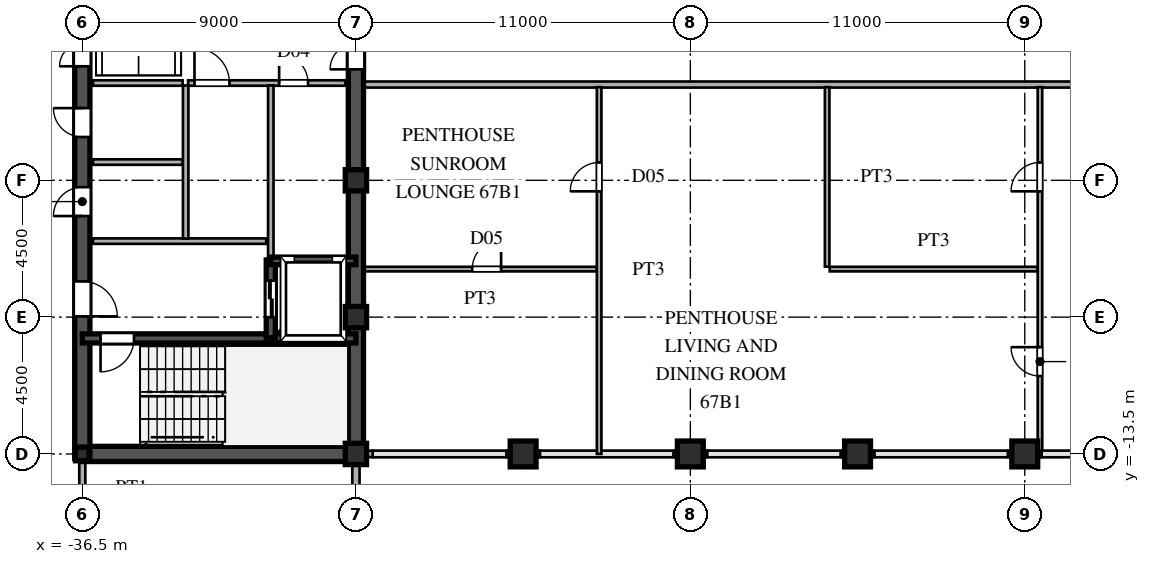
"""IFC4 building model, lengths in metres.
Left out: names, types, materials, properties, quantities, classifications, styles, units other than length and angle.
Written with IfcOpenShell. Run it as: python <this file> out.ifc"""

import sys

from ifc_helpers import new_model, si_unit, direction, frame, frame_2d, origin, origin_2d, place, context, subcontext, project, spatial, rectangle, hollow_rectangle, i_section, extrude, source, transform, mapped, element, fill, save


model = new_model("IFC4")
c1 = context("Model", 3, precision=1e-05, world=origin(), true_north=direction((0.0, 1.0)))
c2 = subcontext(c1, "Body", "Model", "MODEL_VIEW")
j1 = project(units=[si_unit("LENGTHUNIT", "METRE"), si_unit("PLANEANGLEUNIT", "RADIAN")], contexts=[c1])
p1 = place(None, origin())
s1 = spatial("IfcSite", under=j1, at=p1, CompositionType="ELEMENT")
p2 = place(p1, origin())
s2 = spatial("IfcBuilding", under=s1, at=p2, CompositionType="ELEMENT")
p3 = place(p2, frame((0.0, 0.0, 254.4)))
s3 = spatial("IfcBuildingStorey", under=s2, at=p3, CompositionType="ELEMENT", Elevation=254.4)
m1 = source(origin(), c2, "Body", "SweptSolid", [
    extrude(hollow_rectangle(XDim=0.7, YDim=0.7, WallThickness=0.03, at=origin_2d()), origin(), (0.0, 0.0, 1.0), 3.75),
])
for number, where, z_axis, x_axis in (
    (1, (-27.5, -13.5, 0.0), (0.0, 0.0, 1.0), (1.0, 0.0, 0.0)),
    (2, (-27.5, -9.0, 0.0), (0.0, 0.0, 1.0), (1.0, 0.0, 0.0)),
    (3, (-27.5, -4.5, 0.0), (0.0, 0.0, 1.0), (1.0, 0.0, 0.0)),
):
    element("IfcColumn", number, at=place(p3, frame(where, z_axis=z_axis, x_axis=x_axis)), inside=s3, PredefinedType="COLUMN", context=c2, shape_type="MappedRepresentation", body=[
        mapped(m1, transform((0.0, 0.0, 0.0), scale=1.0)),
    ])
m2 = source(origin(), c2, "Body", "SweptSolid", [
    extrude(i_section(OverallWidth=0.45, OverallDepth=0.45, WebThickness=0.016, FlangeThickness=0.025, at=origin_2d()), origin(), (0.0, 0.0, 1.0), 3.75),
])
p4 = place(p3, frame((-36.5, -13.5, 0.0), z_axis=(0.0, 0.0, 1.0), x_axis=(1.0, 0.0, 0.0)))
e4 = element("IfcColumn", 4, at=p4, inside=s3, PredefinedType="COLUMN", context=c2, shape_type="MappedRepresentation", body=[
    mapped(m2, transform((0.0, 0.0, 0.0), scale=1.0)),
])
m3 = source(origin(), c2, "Body", "SweptSolid", [
    extrude(hollow_rectangle(XDim=0.85, YDim=0.85, WallThickness=0.036, at=origin_2d()), origin(), (0.0, 0.0, 1.0), 3.75),
])
for number, where, z_axis, x_axis in (
    (5, (-22.0, -13.5, 0.0), (0.0, 0.0, 1.0), (1.0, 0.0, 0.0)),
    (6, (-16.5, -13.5, 0.0), (0.0, 0.0, 1.0), (1.0, 0.0, 0.0)),
    (7, (-11.0, -13.5, 0.0), (0.0, 0.0, 1.0), (1.0, 0.0, 0.0)),
    (8, (-5.5, -13.5, 0.0), (0.0, 0.0, 1.0), (1.0, 0.0, 0.0)),
):
    element("IfcColumn", number, at=place(p3, frame(where, z_axis=z_axis, x_axis=x_axis)), inside=s3, PredefinedType="COLUMN", context=c2, shape_type="MappedRepresentation", body=[
        mapped(m3, transform((0.0, 0.0, 0.0), scale=1.0)),
    ])
p5 = place(p3, frame((-27.5, -15.98, 0.0), z_axis=(0.0, 0.0, 1.0), x_axis=(0.0, 1.0, 0.0)))
e9 = element("IfcWall", 9, at=p5, inside=s3, PredefinedType="SOLIDWALL", context=c2, shape_type="SweptSolid", body=[
    extrude(rectangle(XDim=1.605, YDim=0.24, at=frame_2d((0.803, 0.0))), origin(), (0.0, 0.0, 1.0), 3.53),
])
p6 = place(p3, frame((-27.5, -14.375, 0.0), z_axis=(0.0, 0.0, 1.0), x_axis=(0.0, 1.0, 0.0)))
e10 = element("IfcWall", 10, at=p6, inside=s3, PredefinedType="SOLIDWALL", context=c2, shape_type="SweptSolid", body=[
    extrude(rectangle(XDim=0.62, YDim=0.24, at=frame_2d((0.31, 0.0))), origin(), (0.0, 0.0, 1.0), 3.03),
])
p7 = place(p3, frame((-27.49, -13.5, 0.0), z_axis=(0.0, 0.0, 1.0), x_axis=(1.0, 0.0, 0.0)))
e11 = element("IfcWall", 11, at=p7, inside=s3, PredefinedType="SOLIDWALL", context=c2, shape_type="SweptSolid", body=[
    extrude(rectangle(XDim=0.54, YDim=0.21, at=frame_2d((0.27, 0.0))), origin(), (0.0, 0.0, 1.0), 3.03),
])
for number, where, z_axis, x_axis in (
    (12, (-22.55, -13.5, 0.0), (0.0, 0.0, 1.0), (1.0, 0.0, 0.0)),
    (13, (-17.05, -13.5, 0.0), (0.0, 0.0, 1.0), (1.0, 0.0, 0.0)),
    (14, (-11.55, -13.5, 0.0), (0.0, 0.0, 1.0), (1.0, 0.0, 0.0)),
    (15, (-6.05, -13.5, 0.0), (0.0, 0.0, 1.0), (1.0, 0.0, 0.0)),
):
    element("IfcWall", number, at=place(p3, frame(where, z_axis=z_axis, x_axis=x_axis)), inside=s3, PredefinedType="SOLIDWALL", context=c2, shape_type="SweptSolid", body=[
        extrude(rectangle(XDim=1.1, YDim=0.21, at=frame_2d((0.55, 0.0))), origin(), (0.0, 0.0, 1.0), 3.03),
    ])
p8 = place(p3, frame((-27.5, -13.5, 0.0), z_axis=(0.0, 0.0, 1.0), x_axis=(0.0, 1.0, 0.0)))
e16 = element("IfcWall", 16, at=p8, inside=s3, PredefinedType="SHEAR", context=c2, shape_type="SweptSolid", body=[
    extrude(rectangle(XDim=12.2, YDim=0.5, at=frame_2d((6.1, 0.0))), origin(), (0.0, 0.0, 1.0), 3.53),
])
p9 = place(p3, frame((-27.5, -1.3, 0.0), z_axis=(0.0, 0.0, 1.0), x_axis=(0.0, 1.0, 0.0)))
e17 = element("IfcWall", 17, at=p9, inside=s3, PredefinedType="SHEAR", context=c2, shape_type="SweptSolid", body=[
    extrude(rectangle(XDim=2.6, YDim=0.5, at=frame_2d((1.3, 0.0))), origin(), (0.0, 0.0, 1.0), 3.53),
])
p10 = place(p9, frame((0.45, 0.0, 0.0)))
e18 = element("IfcOpeningElement", 18, at=p10, cuts=e17, PredefinedType="OPENING", context=c2, shape_type="SweptSolid", body=[
    extrude(rectangle(XDim=1.7, YDim=2.35, at=frame_2d((0.85, 1.175))), frame((0.0, 0.26, 0.0), z_axis=(0.0, -1.0, 0.0), x_axis=(1.0, 0.0, 0.0)), (0.0, 0.0, 1.0), 0.52),
])
p11 = place(p3, frame((-36.5, -13.5, 0.0), z_axis=(0.0, 0.0, 1.0), x_axis=(1.0, 0.0, 0.0)))
e19 = element("IfcWall", 19, at=p11, inside=s3, PredefinedType="SHEAR", context=c2, shape_type="SweptSolid", body=[
    extrude(rectangle(XDim=9.0, YDim=0.5, at=frame_2d((4.5, 0.0))), origin(), (0.0, 0.0, 1.0), 3.53),
])
p12 = place(p3, frame((-36.5, -13.65, 0.0), z_axis=(0.0, 0.0, 1.0), x_axis=(0.0, 1.0, 0.0)))
e20 = element("IfcWall", 20, at=p12, inside=s3, PredefinedType="SHEAR", context=c2, shape_type="SweptSolid", body=[
    extrude(rectangle(XDim=7.15, YDim=0.5, at=frame_2d((3.575, 0.0))), origin(), (0.0, 0.0, 1.0), 3.53),
])
p13 = place(p12, frame((4.675, 0.0, 0.0)))
e21 = element("IfcOpeningElement", 21, at=p13, cuts=e20, PredefinedType="OPENING", context=c2, shape_type="SweptSolid", body=[
    extrude(rectangle(XDim=1.15, YDim=2.2, at=frame_2d((0.575, 1.1))), frame((0.0, 0.26, 0.0), z_axis=(0.0, -1.0, 0.0), x_axis=(1.0, 0.0, 0.0)), (0.0, 0.0, 1.0), 0.52),
])
p14 = place(p3, frame((-36.5, -1.3, 0.0), z_axis=(0.0, 0.0, 1.0), x_axis=(0.0, 1.0, 0.0)))
e22 = element("IfcWall", 22, at=p14, inside=s3, PredefinedType="SHEAR", context=c2, shape_type="SweptSolid", body=[
    extrude(rectangle(XDim=2.6, YDim=0.5, at=frame_2d((1.3, 0.0))), origin(), (0.0, 0.0, 1.0), 3.53),
])
p15 = place(p14, frame((0.55, 0.0, 0.0)))
e23 = element("IfcOpeningElement", 23, at=p15, cuts=e22, PredefinedType="OPENING", context=c2, shape_type="SweptSolid", body=[
    extrude(rectangle(XDim=1.5, YDim=2.3, at=frame_2d((0.75, 1.15))), frame((0.0, 0.26, 0.0), z_axis=(0.0, -1.0, 0.0), x_axis=(1.0, 0.0, 0.0)), (0.0, 0.0, 1.0), 0.52),
])
p16 = place(p3, frame((-36.5, -6.5, 0.0), z_axis=(0.0, 0.0, 1.0), x_axis=(0.0, 1.0, 0.0)))
e24 = element("IfcWall", 24, at=p16, inside=s3, PredefinedType="SHEAR", context=c2, shape_type="SweptSolid", body=[
    extrude(rectangle(XDim=2.6, YDim=0.5, at=frame_2d((1.3, 0.0))), origin(), (0.0, 0.0, 1.0), 3.53),
])
p17 = place(p16, frame((0.825, 0.0, 0.0)))
e25 = element("IfcOpeningElement", 25, at=p17, cuts=e24, PredefinedType="OPENING", context=c2, shape_type="SweptSolid", body=[
    extrude(rectangle(XDim=0.95, YDim=2.15, at=frame_2d((0.475, 1.075))), frame((0.0, 0.26, 0.0), z_axis=(0.0, -1.0, 0.0), x_axis=(1.0, 0.0, 0.0)), (0.0, 0.0, 1.0), 0.52),
])
p18 = place(p3, frame((-36.5, -3.9, 0.0), z_axis=(0.0, 0.0, 1.0), x_axis=(0.0, 1.0, 0.0)))
e26 = element("IfcWall", 26, at=p18, inside=s3, PredefinedType="SHEAR", context=c2, shape_type="SweptSolid", body=[
    extrude(rectangle(XDim=2.6, YDim=0.5, at=frame_2d((1.3, 0.0))), origin(), (0.0, 0.0, 1.0), 3.53),
])
p19 = place(p18, frame((0.825, 0.0, 0.0)))
e27 = element("IfcOpeningElement", 27, at=p19, cuts=e26, PredefinedType="OPENING", context=c2, shape_type="SweptSolid", body=[
    extrude(rectangle(XDim=0.95, YDim=2.15, at=frame_2d((0.475, 1.075))), frame((0.0, 0.26, 0.0), z_axis=(0.0, -1.0, 0.0), x_axis=(1.0, 0.0, 0.0)), (0.0, 0.0, 1.0), 0.52),
])
p20 = place(p3, frame((-36.5, -9.7, 0.0), z_axis=(0.0, 0.0, 1.0), x_axis=(1.0, 0.0, 0.0)))
e28 = element("IfcWall", 28, at=p20, inside=s3, PredefinedType="SHEAR", context=c2, shape_type="SweptSolid", body=[
    extrude(rectangle(XDim=9.0, YDim=0.3, at=frame_2d((4.5, 0.0))), origin(), (0.0, 0.0, 1.0), 3.53),
])
p21 = place(p20, frame((0.6, 0.0, 0.0)))
e29 = element("IfcOpeningElement", 29, at=p21, cuts=e28, PredefinedType="OPENING", context=c2, shape_type="SweptSolid", body=[
    extrude(rectangle(XDim=1.1, YDim=2.2, at=frame_2d((0.55, 1.1))), frame((0.0, 0.16, 0.0), z_axis=(0.0, -1.0, 0.0), x_axis=(1.0, 0.0, 0.0)), (0.0, 0.0, 1.0), 0.32),
])
p22 = place(p3, frame((-30.3, -7.15, 0.0), z_axis=(0.0, 0.0, 1.0), x_axis=(1.0, 0.0, 0.0)))
e30 = element("IfcWall", 30, at=p22, inside=s3, PredefinedType="SHEAR", context=c2, shape_type="SweptSolid", body=[
    extrude(rectangle(XDim=2.8, YDim=0.25, at=frame_2d((1.4, 0.0))), origin(), (0.0, 0.0, 1.0), 3.53),
])
p23 = place(p3, frame((-30.3, -9.68, 0.0), z_axis=(0.0, 0.0, 1.0), x_axis=(0.0, 1.0, 0.0)))
e31 = element("IfcWall", 31, at=p23, inside=s3, PredefinedType="SHEAR", context=c2, shape_type="SweptSolid", body=[
    extrude(rectangle(XDim=2.56, YDim=0.3, at=frame_2d((1.28, 0.0))), origin(), (0.0, 0.0, 1.0), 3.53),
])
p24 = place(p23, frame((0.68, 0.0, 0.0)))
e32 = element("IfcOpeningElement", 32, at=p24, cuts=e31, PredefinedType="OPENING", context=c2, shape_type="SweptSolid", body=[
    extrude(rectangle(XDim=1.2, YDim=2.25, at=frame_2d((0.6, 1.125))), frame((0.0, 0.16, 0.0), z_axis=(0.0, -1.0, 0.0), x_axis=(1.0, 0.0, 0.0)), (0.0, 0.0, 1.0), 0.32),
])
p25 = place(p3, frame((-36.15, -6.5, 0.0), z_axis=(0.0, 0.0, 1.0), x_axis=(1.0, 0.0, 0.0)))
e33 = element("IfcWall", 33, at=p25, inside=s3, PredefinedType="PARTITIONING", context=c2, shape_type="SweptSolid", body=[
    extrude(rectangle(XDim=5.7, YDim=0.18, at=frame_2d((2.85, 0.0))), origin(), (0.0, 0.0, 1.0), 3.53),
])
p26 = place(p3, frame((-33.1, -6.42, 0.0), z_axis=(0.0, 0.0, 1.0), x_axis=(0.0, 1.0, 0.0)))
e34 = element("IfcWall", 34, at=p26, inside=s3, PredefinedType="PARTITIONING", context=c2, shape_type="SweptSolid", body=[
    extrude(rectangle(XDim=5.04, YDim=0.18, at=frame_2d((2.52, 0.0))), origin(), (0.0, 0.0, 1.0), 3.53),
])
p27 = place(p3, frame((-30.3, -1.3, 0.0), z_axis=(0.0, 0.0, 1.0), x_axis=(1.0, 0.0, 0.0)))
e35 = element("IfcWall", 35, at=p27, inside=s3, PredefinedType="PARTITIONING", context=c2, shape_type="SweptSolid", body=[
    extrude(rectangle(XDim=2.45, YDim=0.18, at=frame_2d((1.225, 0.0))), origin(), (0.0, 0.0, 1.0), 3.53),
])
p28 = place(p27, frame((0.275, 0.0, 0.0)))
e36 = element("IfcOpeningElement", 36, at=p28, cuts=e35, PredefinedType="OPENING", context=c2, shape_type="SweptSolid", body=[
    extrude(rectangle(XDim=0.95, YDim=2.15, at=frame_2d((0.475, 1.075))), frame((0.0, 0.1, 0.0), z_axis=(0.0, -1.0, 0.0), x_axis=(1.0, 0.0, 0.0)), (0.0, 0.0, 1.0), 0.2),
])
p29 = place(p3, frame((-33.02, -1.3, 0.0), z_axis=(0.0, 0.0, 1.0), x_axis=(1.0, 0.0, 0.0)))
e37 = element("IfcWall", 37, at=p29, inside=s3, PredefinedType="PARTITIONING", context=c2, shape_type="SweptSolid", body=[
    extrude(rectangle(XDim=2.72, YDim=0.18, at=frame_2d((1.36, 0.0))), origin(), (0.0, 0.0, 1.0), 3.53),
])
p30 = place(p29, frame((0.21, 0.0, 0.0)))
e38 = element("IfcOpeningElement", 38, at=p30, cuts=e37, PredefinedType="OPENING", context=c2, shape_type="SweptSolid", body=[
    extrude(rectangle(XDim=1.15, YDim=2.2, at=frame_2d((0.575, 1.1))), frame((0.0, 0.1, 0.0), z_axis=(0.0, -1.0, 0.0), x_axis=(1.0, 0.0, 0.0)), (0.0, 0.0, 1.0), 0.2),
])
p31 = place(p3, frame((-30.3, -7.12, 0.0), z_axis=(0.0, 0.0, 1.0), x_axis=(0.0, 1.0, 0.0)))
e39 = element("IfcWall", 39, at=p31, inside=s3, PredefinedType="PARTITIONING", context=c2, shape_type="SweptSolid", body=[
    extrude(rectangle(XDim=5.74, YDim=0.18, at=frame_2d((2.87, 0.0))), origin(), (0.0, 0.0, 1.0), 3.53),
])
for number, where, z_axis, x_axis in (
    (40, (-36.15, -1.3, 0.0), (0.0, 0.0, 1.0), (1.0, 0.0, 0.0)),
    (41, (-36.15, -3.9, 0.0), (0.0, 0.0, 1.0), (1.0, 0.0, 0.0)),
):
    element("IfcWall", number, at=place(p3, frame(where, z_axis=z_axis, x_axis=x_axis)), inside=s3, PredefinedType="PARTITIONING", context=c2, shape_type="SweptSolid", body=[
        extrude(rectangle(XDim=2.95, YDim=0.18, at=frame_2d((1.475, 0.0))), origin(), (0.0, 0.0, 1.0), 3.53),
    ])
p32 = place(p3, frame((-27.245, -7.42, 0.0), z_axis=(0.0, 0.0, 1.0), x_axis=(1.0, 0.0, 0.0)))
e42 = element("IfcWall", 42, at=p32, inside=s3, PredefinedType="PARTITIONING", context=c2, shape_type="SweptSolid", body=[
    extrude(rectangle(XDim=7.66, YDim=0.15, at=frame_2d((3.83, 0.0))), origin(), (0.0, 0.0, 1.0), 3.53),
])
p33 = place(p32, frame((3.57, 0.0, 0.0)))
e43 = element("IfcOpeningElement", 43, at=p33, cuts=e42, PredefinedType="OPENING", context=c2, shape_type="SweptSolid", body=[
    extrude(rectangle(XDim=0.95, YDim=2.15, at=frame_2d((0.475, 1.075))), frame((0.0, 0.085, 0.0), z_axis=(0.0, -1.0, 0.0), x_axis=(1.0, 0.0, 0.0)), (0.0, 0.0, 1.0), 0.17),
])
p34 = place(p3, frame((-11.915, -7.42, 0.0), z_axis=(0.0, 0.0, 1.0), x_axis=(1.0, 0.0, 0.0)))
e44 = element("IfcWall", 44, at=p34, inside=s3, PredefinedType="PARTITIONING", context=c2, shape_type="SweptSolid", body=[
    extrude(rectangle(XDim=6.83, YDim=0.15, at=frame_2d((3.415, 0.0))), origin(), (0.0, 0.0, 1.0), 3.53),
])
p35 = place(p3, frame((-27.245, -1.35, 0.0), z_axis=(0.0, 0.0, 1.0), x_axis=(1.0, 0.0, 0.0)))
e45 = element("IfcWall", 45, at=p35, inside=s3, PredefinedType="PARTITIONING", context=c2, shape_type="SweptSolid", body=[
    extrude(rectangle(XDim=54.49, YDim=0.2, at=frame_2d((27.245, 0.0))), origin(), (0.0, 0.0, 1.0), 3.53),
])
p36 = place(p35, frame((24.97, 0.0, 0.0)))
e46 = element("IfcOpeningElement", 46, at=p36, cuts=e45, PredefinedType="OPENING", context=c2, shape_type="SweptSolid", body=[
    extrude(rectangle(XDim=1.05, YDim=2.25, at=frame_2d((0.525, 1.125))), frame((0.0, 0.11, 0.0), z_axis=(0.0, -1.0, 0.0), x_axis=(1.0, 0.0, 0.0)), (0.0, 0.0, 1.0), 0.22),
])
p37 = place(p3, frame((-36.5, -15.515, 0.0), z_axis=(0.0, 0.0, 1.0), x_axis=(0.0, 1.0, 0.0)))
e47 = element("IfcWall", 47, at=p37, inside=s3, PredefinedType="PARTITIONING", context=c2, shape_type="SweptSolid", body=[
    extrude(rectangle(XDim=1.76, YDim=0.2, at=frame_2d((0.88, 0.0))), origin(), (0.0, 0.0, 1.0), 2.93),
])
p38 = place(p3, frame((-19.5, -13.5, 0.0), z_axis=(0.0, 0.0, 1.0), x_axis=(0.0, 1.0, 0.0)))
e48 = element("IfcWall", 48, at=p38, inside=s3, PredefinedType="PARTITIONING", context=c2, shape_type="SweptSolid", body=[
    extrude(rectangle(XDim=12.065, YDim=0.15, at=frame_2d((6.032, 0.0))), origin(), (0.0, 0.0, 1.0), 3.53),
])
p39 = place(p38, frame((8.637, 0.0, 0.0)))
e49 = element("IfcOpeningElement", 49, at=p39, cuts=e48, PredefinedType="OPENING", context=c2, shape_type="SweptSolid", body=[
    extrude(rectangle(XDim=0.95, YDim=2.15, at=frame_2d((0.475, 1.075))), frame((0.0, 0.085, 0.0), z_axis=(0.0, -1.0, 0.0), x_axis=(1.0, 0.0, 0.0)), (0.0, 0.0, 1.0), 0.17),
])
p40 = place(p3, frame((-12.0, -7.34, 0.0), z_axis=(0.0, 0.0, 1.0), x_axis=(0.0, 1.0, 0.0)))
e50 = element("IfcWall", 50, at=p40, inside=s3, PredefinedType="PARTITIONING", context=c2, shape_type="SweptSolid", body=[
    extrude(rectangle(XDim=5.905, YDim=0.15, at=frame_2d((2.953, 0.0))), origin(), (0.0, 0.0, 1.0), 3.53),
])
p41 = place(p3, frame((-5.0, -13.39, 0.0), z_axis=(0.0, 0.0, 1.0), x_axis=(0.0, 1.0, 0.0)))
e51 = element("IfcWall", 51, at=p41, inside=s3, PredefinedType="PARTITIONING", context=c2, shape_type="SweptSolid", body=[
    extrude(rectangle(XDim=11.955, YDim=0.15, at=frame_2d((5.978, 0.0))), origin(), (0.0, 0.0, 1.0), 3.53),
])
p42 = place(p41, frame((8.528, 0.0, 0.0)))
e52 = element("IfcOpeningElement", 52, at=p42, cuts=e51, PredefinedType="OPENING", context=c2, shape_type="SweptSolid", body=[
    extrude(rectangle(XDim=0.95, YDim=2.15, at=frame_2d((0.475, 1.075))), frame((0.0, 0.085, 0.0), z_axis=(0.0, -1.0, 0.0), x_axis=(1.0, 0.0, 0.0)), (0.0, 0.0, 1.0), 0.17),
])
p43 = place(p41, frame((2.452, 0.0, 0.0)))
e53 = element("IfcOpeningElement", 53, at=p43, cuts=e51, PredefinedType="OPENING", context=c2, shape_type="SweptSolid", body=[
    extrude(rectangle(XDim=0.95, YDim=2.15, at=frame_2d((0.475, 1.075))), frame((0.0, 0.085, 0.0), z_axis=(0.0, -1.0, 0.0), x_axis=(1.0, 0.0, 0.0)), (0.0, 0.0, 1.0), 0.17),
])
m4 = source(origin(), c2, "Body", "SweptSolid", [
    extrude(rectangle(XDim=1.7, YDim=2.35, at=frame_2d((0.85, 1.175))), frame((0.0, 0.025, 0.0), z_axis=(0.0, -1.0, 0.0), x_axis=(1.0, 0.0, 0.0)), (0.0, 0.0, 1.0), 0.05),
])
p44 = place(p10, origin())
e54 = element("IfcDoor", 54, at=p44, inside=s3, OperationType="DOUBLE_SWING_LEFT", PredefinedType="DOOR", context=c2, shape_type="MappedRepresentation", body=[
    mapped(m4, transform((0.0, 0.0, 0.0), scale=1.0)),
])
fill(e18, e54)
m5 = source(origin(), c2, "Body", "SweptSolid", [
    extrude(rectangle(XDim=1.15, YDim=2.2, at=frame_2d((0.575, 1.1))), frame((0.0, 0.025, 0.0), z_axis=(0.0, -1.0, 0.0), x_axis=(1.0, 0.0, 0.0)), (0.0, 0.0, 1.0), 0.05),
])
p45 = place(p13, frame((1.15, 0.0, 0.0), z_axis=(0.0, 0.0, 1.0), x_axis=(-1.0, 0.0, 0.0)))
e55 = element("IfcDoor", 55, at=p45, inside=s3, OperationType="SINGLE_SWING_LEFT", PredefinedType="DOOR", context=c2, shape_type="MappedRepresentation", body=[
    mapped(m5, transform((0.0, 0.0, 0.0), scale=1.0)),
])
fill(e21, e55)
m6 = source(origin(), c2, "Body", "SweptSolid", [
    extrude(rectangle(XDim=1.5, YDim=2.3, at=frame_2d((0.75, 1.15))), frame((0.0, 0.025, 0.0), z_axis=(0.0, -1.0, 0.0), x_axis=(1.0, 0.0, 0.0)), (0.0, 0.0, 1.0), 0.05),
])
p46 = place(p15, origin())
e56 = element("IfcDoor", 56, at=p46, inside=s3, OperationType="DOUBLE_SWING_LEFT", PredefinedType="DOOR", context=c2, shape_type="MappedRepresentation", body=[
    mapped(m6, transform((0.0, 0.0, 0.0), scale=1.0)),
])
fill(e23, e56)
m7 = source(origin(), c2, "Body", "SweptSolid", [
    extrude(rectangle(XDim=0.95, YDim=2.15, at=frame_2d((0.475, 1.075))), frame((0.0, 0.025, 0.0), z_axis=(0.0, -1.0, 0.0), x_axis=(1.0, 0.0, 0.0)), (0.0, 0.0, 1.0), 0.05),
])
p47 = place(p17, origin())
e57 = element("IfcDoor", 57, at=p47, inside=s3, OperationType="SINGLE_SWING_LEFT", PredefinedType="DOOR", context=c2, shape_type="MappedRepresentation", body=[
    mapped(m7, transform((0.0, 0.0, 0.0), scale=1.0)),
])
fill(e25, e57)
p48 = place(p19, origin())
e58 = element("IfcDoor", 58, at=p48, inside=s3, OperationType="SINGLE_SWING_RIGHT", PredefinedType="DOOR", context=c2, shape_type="MappedRepresentation", body=[
    mapped(m7, transform((0.0, 0.0, 0.0), scale=1.0)),
])
fill(e27, e58)
m8 = source(origin(), c2, "Body", "SweptSolid", [
    extrude(rectangle(XDim=1.1, YDim=2.2, at=frame_2d((0.55, 1.1))), frame((0.0, 0.025, 0.0), z_axis=(0.0, -1.0, 0.0), x_axis=(1.0, 0.0, 0.0)), (0.0, 0.0, 1.0), 0.05),
])
p49 = place(p21, frame((1.1, 0.0, 0.0), z_axis=(0.0, 0.0, 1.0), x_axis=(-1.0, 0.0, 0.0)))
e59 = element("IfcDoor", 59, at=p49, inside=s3, OperationType="SINGLE_SWING_LEFT", PredefinedType="DOOR", context=c2, shape_type="MappedRepresentation", body=[
    mapped(m8, transform((0.0, 0.0, 0.0), scale=1.0)),
])
fill(e29, e59)
m9 = source(origin(), c2, "Body", "SweptSolid", [
    extrude(rectangle(XDim=1.2, YDim=2.25, at=frame_2d((0.6, 1.125))), frame((0.0, 0.025, 0.0), z_axis=(0.0, -1.0, 0.0), x_axis=(1.0, 0.0, 0.0)), (0.0, 0.0, 1.0), 0.05),
])
p50 = place(p24, origin())
e60 = element("IfcDoor", 60, at=p50, inside=s3, OperationType="DOUBLE_DOOR_SLIDING", PredefinedType="DOOR", context=c2, shape_type="MappedRepresentation", body=[
    mapped(m9, transform((0.0, 0.0, 0.0), scale=1.0)),
])
fill(e32, e60)
p51 = place(p28, origin())
e61 = element("IfcDoor", 61, at=p51, inside=s3, OperationType="SINGLE_SWING_LEFT", PredefinedType="DOOR", context=c2, shape_type="MappedRepresentation", body=[
    mapped(m7, transform((0.0, 0.0, 0.0), scale=1.0)),
])
fill(e36, e61)
p52 = place(p30, origin())
e62 = element("IfcDoor", 62, at=p52, inside=s3, OperationType="SINGLE_SWING_LEFT", PredefinedType="DOOR", context=c2, shape_type="MappedRepresentation", body=[
    mapped(m5, transform((0.0, 0.0, 0.0), scale=1.0)),
])
fill(e38, e62)
m10 = source(origin(), c2, "Body", "SweptSolid", [
    extrude(rectangle(XDim=0.95, YDim=2.15, at=frame_2d((0.475, 1.075))), frame((0.0, 0.025, 0.0), z_axis=(0.0, -1.0, 0.0), x_axis=(1.0, 0.0, 0.0)), (0.0, 0.0, 1.0), 0.05),
])
p53 = place(p33, origin())
e63 = element("IfcDoor", 63, at=p53, inside=s3, OperationType="SINGLE_SWING_RIGHT", PredefinedType="DOOR", context=c2, shape_type="MappedRepresentation", body=[
    mapped(m10, transform((0.0, 0.0, 0.0), scale=1.0)),
])
fill(e43, e63)
p54 = place(p39, origin())
e64 = element("IfcDoor", 64, at=p54, inside=s3, OperationType="SINGLE_SWING_LEFT", PredefinedType="DOOR", context=c2, shape_type="MappedRepresentation", body=[
    mapped(m10, transform((0.0, 0.0, 0.0), scale=1.0)),
])
fill(e49, e64)
p55 = place(p42, origin())
e65 = element("IfcDoor", 65, at=p55, inside=s3, OperationType="SINGLE_SWING_LEFT", PredefinedType="DOOR", context=c2, shape_type="MappedRepresentation", body=[
    mapped(m10, transform((0.0, 0.0, 0.0), scale=1.0)),
])
fill(e52, e65)
p56 = place(p43, origin())
e66 = element("IfcDoor", 66, at=p56, inside=s3, OperationType="SINGLE_SWING_RIGHT", PredefinedType="DOOR", context=c2, shape_type="MappedRepresentation", body=[
    mapped(m10, transform((0.0, 0.0, 0.0), scale=1.0)),
])
fill(e53, e66)
save(model, sys.argv[1])
